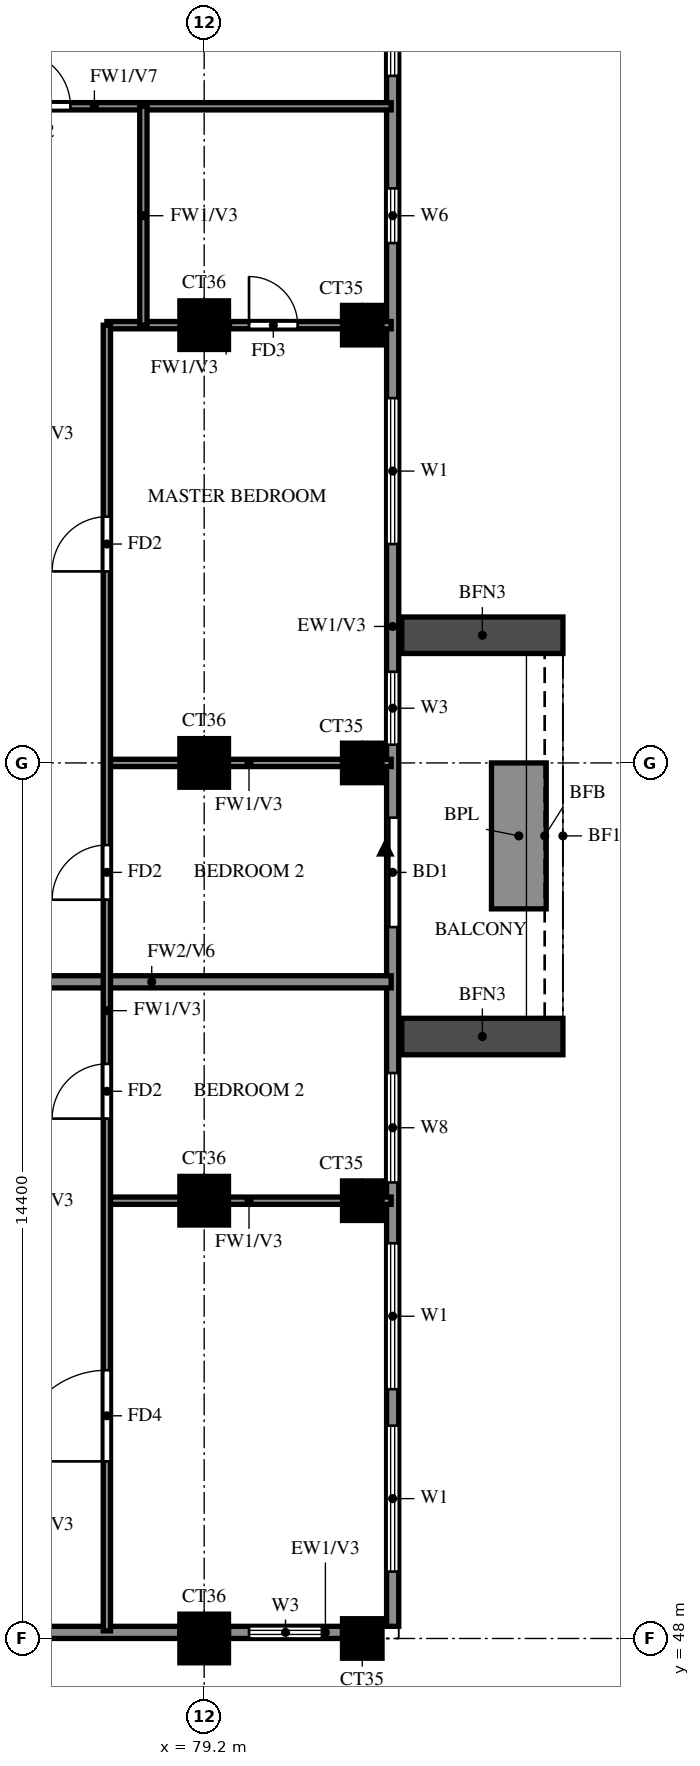
"""IFC4 building model, lengths in metres.
Left out: names, types, materials, properties, quantities, classifications, styles, units other than length and angle.
Written with IfcOpenShell. Run it as: python <this file> out.ifc"""

import sys

from ifc_helpers import new_model, si_unit, direction, frame, frame_2d, origin, origin_2d, place, context, subcontext, project, spatial, rectangle, extrude, source, transform, mapped, element, fill, save


model = new_model("IFC4")
c1 = context("Model", 3, precision=1e-05, world=origin(), true_north=direction((0.0, 1.0)))
c2 = subcontext(c1, "Body", "Model", "MODEL_VIEW")
j1 = project(units=[si_unit("LENGTHUNIT", "METRE"), si_unit("PLANEANGLEUNIT", "RADIAN")], contexts=[c1])
p1 = place(None, origin())
s1 = spatial("IfcSite", under=j1, at=p1, CompositionType="ELEMENT")
p2 = place(p1, origin())
s2 = spatial("IfcBuilding", under=s1, at=p2, CompositionType="ELEMENT")
p3 = place(p2, frame((0.0, 0.0, 243.0)))
s3 = spatial("IfcBuildingStorey", under=s2, at=p3, CompositionType="ELEMENT", Elevation=243.0)
m1 = source(origin(), c2, "Body", "SweptSolid", [
    extrude(rectangle(XDim=0.8, YDim=0.8, at=origin_2d()), origin(), (0.0, 0.0, 1.0), 3.22),
])
p4 = place(p3, frame((79.2, 48.0, 0.0), z_axis=(0.0, 0.0, 1.0), x_axis=(1.0, 0.0, 0.0)))
e1 = element("IfcColumn", 1, at=p4, inside=s3, PredefinedType="COLUMN", context=c2, shape_type="MappedRepresentation", body=[
    mapped(m1, transform((0.0, 0.0, 0.0))),
])
m2 = source(origin(), c2, "Body", "SweptSolid", [
    extrude(rectangle(XDim=0.65, YDim=0.65, at=origin_2d()), origin(), (0.0, 0.0, 1.0), 3.22),
])
p5 = place(p3, frame((81.8, 48.0, 0.0), z_axis=(0.0, 0.0, 1.0), x_axis=(1.0, 0.0, 0.0)))
e2 = element("IfcColumn", 2, at=p5, inside=s3, PredefinedType="COLUMN", context=c2, shape_type="MappedRepresentation", body=[
    mapped(m2, transform((0.0, 0.0, 0.0))),
])
p6 = place(p3, frame((79.2, 55.2, 0.0), z_axis=(0.0, 0.0, 1.0), x_axis=(1.0, 0.0, 0.0)))
e3 = element("IfcColumn", 3, at=p6, inside=s3, PredefinedType="COLUMN", context=c2, shape_type="MappedRepresentation", body=[
    mapped(m1, transform((0.0, 0.0, 0.0))),
])
p7 = place(p3, frame((81.8, 55.2, 0.0), z_axis=(0.0, 0.0, 1.0), x_axis=(1.0, 0.0, 0.0)))
e4 = element("IfcColumn", 4, at=p7, inside=s3, PredefinedType="COLUMN", context=c2, shape_type="MappedRepresentation", body=[
    mapped(m2, transform((0.0, 0.0, 0.0))),
])
p8 = place(p3, frame((79.2, 62.4, 0.0), z_axis=(0.0, 0.0, 1.0), x_axis=(1.0, 0.0, 0.0)))
e5 = element("IfcColumn", 5, at=p8, inside=s3, PredefinedType="COLUMN", context=c2, shape_type="MappedRepresentation", body=[
    mapped(m1, transform((0.0, 0.0, 0.0))),
])
p9 = place(p3, frame((81.8, 62.4, 0.0), z_axis=(0.0, 0.0, 1.0), x_axis=(1.0, 0.0, 0.0)))
e6 = element("IfcColumn", 6, at=p9, inside=s3, PredefinedType="COLUMN", context=c2, shape_type="MappedRepresentation", body=[
    mapped(m2, transform((0.0, 0.0, 0.0))),
])
p10 = place(p3, frame((79.2, 69.6, 0.0), z_axis=(0.0, 0.0, 1.0), x_axis=(1.0, 0.0, 0.0)))
e7 = element("IfcColumn", 7, at=p10, inside=s3, PredefinedType="COLUMN", context=c2, shape_type="MappedRepresentation", body=[
    mapped(m1, transform((0.0, 0.0, 0.0))),
])
p11 = place(p3, frame((81.8, 69.6, 0.0), z_axis=(0.0, 0.0, 1.0), x_axis=(1.0, 0.0, 0.0)))
e8 = element("IfcColumn", 8, at=p11, inside=s3, PredefinedType="COLUMN", context=c2, shape_type="MappedRepresentation", body=[
    mapped(m2, transform((0.0, 0.0, 0.0))),
])
p12 = place(p3, frame((81.907, 39.87, 0.0), z_axis=(0.0, 0.0, 1.0), x_axis=(-0.777936274417, 0.62834318087, 0.0)))
e9 = element("IfcWall", 9, at=p12, inside=s3, PredefinedType="SOLIDWALL", context=c2, shape_type="SweptSolid", body=[
    extrude(rectangle(XDim=13.099, YDim=0.2, at=frame_2d((6.549, 0.0))), origin(), (0.0, 0.0, 1.0), 3.22),
])
p13 = place(p12, frame((9.938, 0.0, 1.5)))
e10 = element("IfcOpeningElement", 10, at=p13, cuts=e9, PredefinedType="OPENING", context=c2, shape_type="SweptSolid", body=[
    extrude(rectangle(XDim=0.9, YDim=0.9, at=frame_2d((0.45, 0.45))), frame((0.0, 0.11, 0.0), z_axis=(0.0, -1.0, 0.0), x_axis=(1.0, 0.0, 0.0)), (0.0, 0.0, 1.0), 0.22),
])
p14 = place(p3, frame((71.987, 48.1, 0.0), z_axis=(0.0, 0.0, 1.0), x_axis=(1.0, 0.0, 0.0)))
e11 = element("IfcWall", 11, at=p14, inside=s3, PredefinedType="SOLIDWALL", context=c2, shape_type="SweptSolid", body=[
    extrude(rectangle(XDim=6.813, YDim=0.2, at=frame_2d((3.406, 0.0))), origin(), (0.0, 0.0, 1.0), 3.22),
])
p15 = place(p3, frame((79.6, 48.1, 0.0), z_axis=(0.0, 0.0, 1.0), x_axis=(1.0, 0.0, 0.0)))
e12 = element("IfcWall", 12, at=p15, inside=s3, PredefinedType="SOLIDWALL", context=c2, shape_type="SweptSolid", body=[
    extrude(rectangle(XDim=1.875, YDim=0.2, at=frame_2d((0.938, 0.0))), origin(), (0.0, 0.0, 1.0), 3.22),
])
p16 = place(p15, frame((0.337, 0.0, 0.6)))
e13 = element("IfcOpeningElement", 13, at=p16, cuts=e12, PredefinedType="OPENING", context=c2, shape_type="SweptSolid", body=[
    extrude(rectangle(XDim=1.2, YDim=2.4, at=frame_2d((0.6, 1.2))), frame((0.0, 0.11, 0.0), z_axis=(0.0, -1.0, 0.0), x_axis=(1.0, 0.0, 0.0)), (0.0, 0.0, 1.0), 0.22),
])
p17 = place(p3, frame((82.3, 48.2, 0.0), z_axis=(0.0, 0.0, 1.0), x_axis=(0.0, 1.0, 0.0)))
e14 = element("IfcWall", 14, at=p17, inside=s3, PredefinedType="SOLIDWALL", context=c2, shape_type="SweptSolid", body=[
    extrude(rectangle(XDim=28.6, YDim=0.2, at=frame_2d((14.3, 0.0))), origin(), (0.0, 0.0, 1.0), 3.22),
])
p18 = place(p17, frame((11.5, 0.0, 0.0)))
e15 = element("IfcOpeningElement", 15, at=p18, cuts=e14, PredefinedType="OPENING", context=c2, shape_type="SweptSolid", body=[
    extrude(rectangle(XDim=1.8, YDim=2.4, at=frame_2d((0.9, 1.2))), frame((0.0, 0.11, 0.0), z_axis=(0.0, -1.0, 0.0), x_axis=(1.0, 0.0, 0.0)), (0.0, 0.0, 1.0), 0.22),
])
p19 = place(p17, frame((0.9, 0.0, 0.6)))
e16 = element("IfcOpeningElement", 16, at=p19, cuts=e14, PredefinedType="OPENING", context=c2, shape_type="SweptSolid", body=[
    extrude(rectangle(XDim=2.4, YDim=2.4, at=frame_2d((1.2, 1.2))), frame((0.0, 0.11, 0.0), z_axis=(0.0, -1.0, 0.0), x_axis=(1.0, 0.0, 0.0)), (0.0, 0.0, 1.0), 0.22),
])
p20 = place(p17, frame((3.9, 0.0, 0.6)))
e17 = element("IfcOpeningElement", 17, at=p20, cuts=e14, PredefinedType="OPENING", context=c2, shape_type="SweptSolid", body=[
    extrude(rectangle(XDim=2.4, YDim=2.4, at=frame_2d((1.2, 1.2))), frame((0.0, 0.11, 0.0), z_axis=(0.0, -1.0, 0.0), x_axis=(1.0, 0.0, 0.0)), (0.0, 0.0, 1.0), 0.22),
])
p21 = place(p17, frame((7.3, 0.0, 0.6)))
e18 = element("IfcOpeningElement", 18, at=p21, cuts=e14, PredefinedType="OPENING", context=c2, shape_type="SweptSolid", body=[
    extrude(rectangle(XDim=1.8, YDim=2.4, at=frame_2d((0.9, 1.2))), frame((0.0, 0.11, 0.0), z_axis=(0.0, -1.0, 0.0), x_axis=(1.0, 0.0, 0.0)), (0.0, 0.0, 1.0), 0.22),
])
p22 = place(p17, frame((14.5, 0.0, 0.6)))
e19 = element("IfcOpeningElement", 19, at=p22, cuts=e14, PredefinedType="OPENING", context=c2, shape_type="SweptSolid", body=[
    extrude(rectangle(XDim=1.2, YDim=2.4, at=frame_2d((0.6, 1.2))), frame((0.0, 0.11, 0.0), z_axis=(0.0, -1.0, 0.0), x_axis=(1.0, 0.0, 0.0)), (0.0, 0.0, 1.0), 0.22),
])
p23 = place(p17, frame((17.8, 0.0, 0.6)))
e20 = element("IfcOpeningElement", 20, at=p23, cuts=e14, PredefinedType="OPENING", context=c2, shape_type="SweptSolid", body=[
    extrude(rectangle(XDim=2.4, YDim=2.4, at=frame_2d((1.2, 1.2))), frame((0.0, 0.11, 0.0), z_axis=(0.0, -1.0, 0.0), x_axis=(1.0, 0.0, 0.0)), (0.0, 0.0, 1.0), 0.22),
])
p24 = place(p17, frame((22.75, 0.0, 1.5)))
e21 = element("IfcOpeningElement", 21, at=p24, cuts=e14, PredefinedType="OPENING", context=c2, shape_type="SweptSolid", body=[
    extrude(rectangle(XDim=0.9, YDim=0.9, at=frame_2d((0.45, 0.45))), frame((0.0, 0.11, 0.0), z_axis=(0.0, -1.0, 0.0), x_axis=(1.0, 0.0, 0.0)), (0.0, 0.0, 1.0), 0.22),
])
p25 = place(p17, frame((25.5, 0.0, 0.6)))
e22 = element("IfcOpeningElement", 22, at=p25, cuts=e14, PredefinedType="OPENING", context=c2, shape_type="SweptSolid", body=[
    extrude(rectangle(XDim=2.4, YDim=2.4, at=frame_2d((1.2, 1.2))), frame((0.0, 0.11, 0.0), z_axis=(0.0, -1.0, 0.0), x_axis=(1.0, 0.0, 0.0)), (0.0, 0.0, 1.0), 0.22),
])
for number, where, z_axis, x_axis in (
    (23, (82.45, 57.9, 0.0), (0.0, 0.0, 1.0), (1.0, 0.0, 0.0)),
    (24, (82.45, 64.5, 0.0), (0.0, 0.0, 1.0), (1.0, 0.0, 0.0)),
):
    element("IfcWall", number, at=place(p3, frame(where, z_axis=z_axis, x_axis=x_axis)), inside=s3, PredefinedType="SOLIDWALL", context=c2, shape_type="SweptSolid", body=[
        extrude(rectangle(XDim=2.65, YDim=0.6, at=frame_2d((1.325, 0.0))), origin(), (0.0, 0.0, 1.0), 2.85),
    ])
p26 = place(p3, frame((84.375, 60.0, 0.0), z_axis=(0.0, 0.0, 1.0), x_axis=(0.0, 1.0, 0.0)))
e25 = element("IfcWall", 25, at=p26, inside=s3, PredefinedType="SOLIDWALL", context=c2, shape_type="SweptSolid", body=[
    extrude(rectangle(XDim=2.4, YDim=0.9, at=frame_2d((1.2, 0.0))), origin(), (0.0, 0.0, 1.0), 0.9),
])
p27 = place(p3, frame((74.4, 58.8, 0.0), z_axis=(0.0, 0.0, 1.0), x_axis=(1.0, 0.0, 0.0)))
e26 = element("IfcWall", 26, at=p27, inside=s3, PredefinedType="SOLIDWALL", context=c2, shape_type="SweptSolid", body=[
    extrude(rectangle(XDim=7.875, YDim=0.2, at=frame_2d((3.938, 0.0))), origin(), (0.0, 0.0, 1.0), 2.32),
])
for number, where, z_axis, x_axis in (
    (27, (77.6, 55.2, 0.0), (0.0, 0.0, 1.0), (1.0, 0.0, 0.0)),
    (28, (77.6, 62.4, 0.0), (0.0, 0.0, 1.0), (1.0, 0.0, 0.0)),
):
    element("IfcWall", number, at=place(p3, frame(where, z_axis=z_axis, x_axis=x_axis)), inside=s3, PredefinedType="PARTITIONING", context=c2, shape_type="SweptSolid", body=[
        extrude(rectangle(XDim=4.675, YDim=0.12, at=frame_2d((2.337, 0.0))), origin(), (0.0, 0.0, 1.0), 3.22),
    ])
p28 = place(p3, frame((77.6, 69.6, 0.0), z_axis=(0.0, 0.0, 1.0), x_axis=(1.0, 0.0, 0.0)))
e29 = element("IfcWall", 29, at=p28, inside=s3, PredefinedType="PARTITIONING", context=c2, shape_type="SweptSolid", body=[
    extrude(rectangle(XDim=4.675, YDim=0.12, at=frame_2d((2.337, 0.0))), origin(), (0.0, 0.0, 1.0), 3.22),
])
p29 = place(p28, frame((2.337, 0.0, 0.0)))
e30 = element("IfcOpeningElement", 30, at=p29, cuts=e29, PredefinedType="OPENING", context=c2, shape_type="SweptSolid", body=[
    extrude(rectangle(XDim=0.8, YDim=2.1, at=frame_2d((0.4, 1.05))), frame((0.0, 0.07, 0.0), z_axis=(0.0, -1.0, 0.0), x_axis=(1.0, 0.0, 0.0)), (0.0, 0.0, 1.0), 0.14),
])
p30 = place(p3, frame((72.0, 73.2, 0.0), z_axis=(0.0, 0.0, 1.0), x_axis=(1.0, 0.0, 0.0)))
e31 = element("IfcWall", 31, at=p30, inside=s3, PredefinedType="PARTITIONING", context=c2, shape_type="SweptSolid", body=[
    extrude(rectangle(XDim=10.275, YDim=0.12, at=frame_2d((5.137, 0.0))), origin(), (0.0, 0.0, 1.0), 2.32),
])
p31 = place(p30, frame((4.1, 0.0, 0.0)))
e32 = element("IfcOpeningElement", 32, at=p31, cuts=e31, PredefinedType="OPENING", context=c2, shape_type="SweptSolid", body=[
    extrude(rectangle(XDim=0.9, YDim=2.1, at=frame_2d((0.45, 1.05))), frame((0.0, 0.07, 0.0), z_axis=(0.0, -1.0, 0.0), x_axis=(1.0, 0.0, 0.0)), (0.0, 0.0, 1.0), 0.14),
])
p32 = place(p3, frame((77.6, 48.125, 0.0), z_axis=(0.0, 0.0, 1.0), x_axis=(0.0, 1.0, 0.0)))
e33 = element("IfcWall", 33, at=p32, inside=s3, PredefinedType="PARTITIONING", context=c2, shape_type="SweptSolid", body=[
    extrude(rectangle(XDim=21.475, YDim=0.12, at=frame_2d((10.738, 0.0))), origin(), (0.0, 0.0, 1.0), 3.22),
])
p33 = place(p32, frame((2.788, 0.0, 0.0)))
e34 = element("IfcOpeningElement", 34, at=p33, cuts=e33, PredefinedType="OPENING", context=c2, shape_type="SweptSolid", body=[
    extrude(rectangle(XDim=1.5, YDim=2.1, at=frame_2d((0.75, 1.05))), frame((0.0, 0.07, 0.0), z_axis=(0.0, -1.0, 0.0), x_axis=(1.0, 0.0, 0.0)), (0.0, 0.0, 1.0), 0.14),
])
p34 = place(p32, frame((8.425, 0.0, 0.0)))
e35 = element("IfcOpeningElement", 35, at=p34, cuts=e33, PredefinedType="OPENING", context=c2, shape_type="SweptSolid", body=[
    extrude(rectangle(XDim=0.9, YDim=2.1, at=frame_2d((0.45, 1.05))), frame((0.0, 0.07, 0.0), z_axis=(0.0, -1.0, 0.0), x_axis=(1.0, 0.0, 0.0)), (0.0, 0.0, 1.0), 0.14),
])
p35 = place(p32, frame((12.025, 0.0, 0.0)))
e36 = element("IfcOpeningElement", 36, at=p35, cuts=e33, PredefinedType="OPENING", context=c2, shape_type="SweptSolid", body=[
    extrude(rectangle(XDim=0.9, YDim=2.1, at=frame_2d((0.45, 1.05))), frame((0.0, 0.07, 0.0), z_axis=(0.0, -1.0, 0.0), x_axis=(1.0, 0.0, 0.0)), (0.0, 0.0, 1.0), 0.14),
])
p36 = place(p32, frame((17.425, 0.0, 0.0)))
e37 = element("IfcOpeningElement", 37, at=p36, cuts=e33, PredefinedType="OPENING", context=c2, shape_type="SweptSolid", body=[
    extrude(rectangle(XDim=0.9, YDim=2.1, at=frame_2d((0.45, 1.05))), frame((0.0, 0.07, 0.0), z_axis=(0.0, -1.0, 0.0), x_axis=(1.0, 0.0, 0.0)), (0.0, 0.0, 1.0), 0.14),
])
p37 = place(p3, frame((78.2, 69.6, 0.0), z_axis=(0.0, 0.0, 1.0), x_axis=(0.0, 1.0, 0.0)))
e38 = element("IfcWall", 38, at=p37, inside=s3, PredefinedType="PARTITIONING", context=c2, shape_type="SweptSolid", body=[
    extrude(rectangle(XDim=3.6, YDim=0.12, at=frame_2d((1.8, 0.0))), origin(), (0.0, 0.0, 1.0), 3.22),
])
p38 = place(p16, origin())
e39 = element("IfcWindow", 39, at=p38, inside=s3, PartitioningType="SINGLE_PANEL", PredefinedType="WINDOW", context=c2, shape_type="SweptSolid", body=[
    extrude(rectangle(XDim=1.2, YDim=2.4, at=frame_2d((0.6, 1.2))), frame((0.0, 0.03, 0.0), z_axis=(0.0, -1.0, 0.0), x_axis=(1.0, 0.0, 0.0)), (0.0, 0.0, 1.0), 0.06),
])
fill(e13, e39)
p39 = place(p18, origin())
e40 = element("IfcDoor", 40, at=p39, inside=s3, OperationType="DOUBLE_DOOR_SLIDING", PredefinedType="DOOR", context=c2, shape_type="SweptSolid", body=[
    extrude(rectangle(XDim=1.8, YDim=2.4, at=frame_2d((0.9, 1.2))), frame((0.0, 0.025, 0.0), z_axis=(0.0, -1.0, 0.0), x_axis=(1.0, 0.0, 0.0)), (0.0, 0.0, 1.0), 0.05),
])
fill(e15, e40)
p40 = place(p19, origin())
e41 = element("IfcWindow", 41, at=p40, inside=s3, PartitioningType="DOUBLE_PANEL_VERTICAL", PredefinedType="WINDOW", context=c2, shape_type="SweptSolid", body=[
    extrude(rectangle(XDim=2.4, YDim=2.4, at=frame_2d((1.2, 1.2))), frame((0.0, 0.03, 0.0), z_axis=(0.0, -1.0, 0.0), x_axis=(1.0, 0.0, 0.0)), (0.0, 0.0, 1.0), 0.06),
])
fill(e16, e41)
p41 = place(p20, origin())
e42 = element("IfcWindow", 42, at=p41, inside=s3, PartitioningType="DOUBLE_PANEL_VERTICAL", PredefinedType="WINDOW", context=c2, shape_type="SweptSolid", body=[
    extrude(rectangle(XDim=2.4, YDim=2.4, at=frame_2d((1.2, 1.2))), frame((0.0, 0.03, 0.0), z_axis=(0.0, -1.0, 0.0), x_axis=(1.0, 0.0, 0.0)), (0.0, 0.0, 1.0), 0.06),
])
fill(e17, e42)
p42 = place(p21, origin())
e43 = element("IfcWindow", 43, at=p42, inside=s3, PartitioningType="DOUBLE_PANEL_VERTICAL", PredefinedType="WINDOW", context=c2, shape_type="SweptSolid", body=[
    extrude(rectangle(XDim=1.8, YDim=2.4, at=frame_2d((0.9, 1.2))), frame((0.0, 0.03, 0.0), z_axis=(0.0, -1.0, 0.0), x_axis=(1.0, 0.0, 0.0)), (0.0, 0.0, 1.0), 0.06),
])
fill(e18, e43)
p43 = place(p22, origin())
e44 = element("IfcWindow", 44, at=p43, inside=s3, PartitioningType="SINGLE_PANEL", PredefinedType="WINDOW", context=c2, shape_type="SweptSolid", body=[
    extrude(rectangle(XDim=1.2, YDim=2.4, at=frame_2d((0.6, 1.2))), frame((0.0, 0.03, 0.0), z_axis=(0.0, -1.0, 0.0), x_axis=(1.0, 0.0, 0.0)), (0.0, 0.0, 1.0), 0.06),
])
fill(e19, e44)
p44 = place(p23, origin())
e45 = element("IfcWindow", 45, at=p44, inside=s3, PartitioningType="DOUBLE_PANEL_VERTICAL", PredefinedType="WINDOW", context=c2, shape_type="SweptSolid", body=[
    extrude(rectangle(XDim=2.4, YDim=2.4, at=frame_2d((1.2, 1.2))), frame((0.0, 0.03, 0.0), z_axis=(0.0, -1.0, 0.0), x_axis=(1.0, 0.0, 0.0)), (0.0, 0.0, 1.0), 0.06),
])
fill(e20, e45)
p45 = place(p24, origin())
e46 = element("IfcWindow", 46, at=p45, inside=s3, PartitioningType="SINGLE_PANEL", PredefinedType="WINDOW", context=c2, shape_type="SweptSolid", body=[
    extrude(rectangle(XDim=0.9, YDim=0.9, at=frame_2d((0.45, 0.45))), frame((0.0, 0.03, 0.0), z_axis=(0.0, -1.0, 0.0), x_axis=(1.0, 0.0, 0.0)), (0.0, 0.0, 1.0), 0.06),
])
fill(e21, e46)
p46 = place(p25, origin())
e47 = element("IfcWindow", 47, at=p46, inside=s3, PartitioningType="DOUBLE_PANEL_VERTICAL", PredefinedType="WINDOW", context=c2, shape_type="SweptSolid", body=[
    extrude(rectangle(XDim=2.4, YDim=2.4, at=frame_2d((1.2, 1.2))), frame((0.0, 0.03, 0.0), z_axis=(0.0, -1.0, 0.0), x_axis=(1.0, 0.0, 0.0)), (0.0, 0.0, 1.0), 0.06),
])
fill(e22, e47)
p47 = place(p33, origin())
e48 = element("IfcDoor", 48, at=p47, inside=s3, OperationType="SINGLE_SWING_LEFT", PredefinedType="DOOR", context=c2, shape_type="SweptSolid", body=[
    extrude(rectangle(XDim=1.5, YDim=2.1, at=frame_2d((0.75, 1.05))), frame((0.0, 0.025, 0.0), z_axis=(0.0, -1.0, 0.0), x_axis=(1.0, 0.0, 0.0)), (0.0, 0.0, 1.0), 0.05),
])
fill(e34, e48)
p48 = place(p34, origin())
e49 = element("IfcDoor", 49, at=p48, inside=s3, OperationType="SINGLE_SWING_LEFT", PredefinedType="DOOR", context=c2, shape_type="SweptSolid", body=[
    extrude(rectangle(XDim=0.9, YDim=2.1, at=frame_2d((0.45, 1.05))), frame((0.0, 0.025, 0.0), z_axis=(0.0, -1.0, 0.0), x_axis=(1.0, 0.0, 0.0)), (0.0, 0.0, 1.0), 0.05),
])
fill(e35, e49)
p49 = place(p35, origin())
e50 = element("IfcDoor", 50, at=p49, inside=s3, OperationType="SINGLE_SWING_LEFT", PredefinedType="DOOR", context=c2, shape_type="SweptSolid", body=[
    extrude(rectangle(XDim=0.9, YDim=2.1, at=frame_2d((0.45, 1.05))), frame((0.0, 0.025, 0.0), z_axis=(0.0, -1.0, 0.0), x_axis=(1.0, 0.0, 0.0)), (0.0, 0.0, 1.0), 0.05),
])
fill(e36, e50)
p50 = place(p36, origin())
e51 = element("IfcDoor", 51, at=p50, inside=s3, OperationType="SINGLE_SWING_LEFT", PredefinedType="DOOR", context=c2, shape_type="SweptSolid", body=[
    extrude(rectangle(XDim=0.9, YDim=2.1, at=frame_2d((0.45, 1.05))), frame((0.0, 0.025, 0.0), z_axis=(0.0, -1.0, 0.0), x_axis=(1.0, 0.0, 0.0)), (0.0, 0.0, 1.0), 0.05),
])
fill(e37, e51)
p51 = place(p29, origin())
e52 = element("IfcDoor", 52, at=p51, inside=s3, OperationType="SINGLE_SWING_LEFT", PredefinedType="DOOR", context=c2, shape_type="SweptSolid", body=[
    extrude(rectangle(XDim=0.8, YDim=2.1, at=frame_2d((0.4, 1.05))), frame((0.0, 0.025, 0.0), z_axis=(0.0, -1.0, 0.0), x_axis=(1.0, 0.0, 0.0)), (0.0, 0.0, 1.0), 0.05),
])
fill(e30, e52)
p52 = place(p31, origin())
e53 = element("IfcDoor", 53, at=p52, inside=s3, OperationType="SINGLE_SWING_LEFT", PredefinedType="DOOR", context=c2, shape_type="SweptSolid", body=[
    extrude(rectangle(XDim=0.9, YDim=2.1, at=frame_2d((0.45, 1.05))), frame((0.0, 0.025, 0.0), z_axis=(0.0, -1.0, 0.0), x_axis=(1.0, 0.0, 0.0)), (0.0, 0.0, 1.0), 0.05),
])
fill(e32, e53)
save(model, sys.argv[1])
